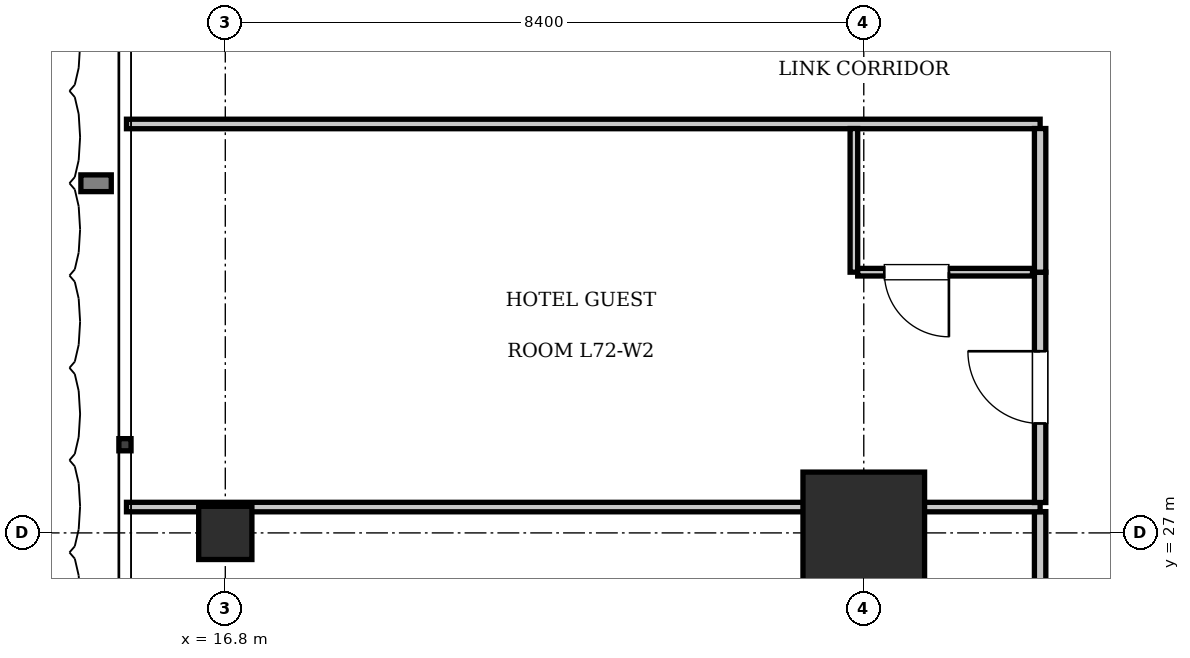
"""IFC4 building model, lengths in metres.
Left out: names, types, materials, properties, quantities, classifications, styles, units other than length and angle.
Written with IfcOpenShell. Run it as: python <this file> out.ifc"""

import sys

from ifc_helpers import new_model, si_unit, direction, frame, frame_2d, origin, origin_2d, place, context, subcontext, project, spatial, rectangle, extrude, element, fill, save


model = new_model("IFC4")
c1 = context("Model", 3, precision=1e-05, world=origin(), true_north=direction((0.0, 1.0)))
c2 = subcontext(c1, "Body", "Model", "MODEL_VIEW")
j1 = project(units=[si_unit("LENGTHUNIT", "METRE"), si_unit("PLANEANGLEUNIT", "RADIAN")], contexts=[c1])
p1 = place(None, origin())
s1 = spatial("IfcSite", under=j1, at=p1, CompositionType="ELEMENT")
p2 = place(p1, origin())
s2 = spatial("IfcBuilding", under=s1, at=p2, CompositionType="ELEMENT")
p3 = place(p2, frame((0.0, 0.0, 293.3)))
s3 = spatial("IfcBuildingStorey", under=s2, at=p3, CompositionType="ELEMENT", Elevation=293.3)
p4 = place(p3, frame((25.2, 27.0, 0.0), z_axis=(0.0, 0.0, 1.0), x_axis=(1.0, 0.0, 0.0)))
e1 = element("IfcColumn", 1, at=p4, inside=s3, PredefinedType="COLUMN", context=c2, shape_type="SweptSolid", body=[
    extrude(rectangle(XDim=1.6, YDim=1.6, at=origin_2d()), origin(), (0.0, 0.0, 1.0), 3.85),
])
p5 = place(p3, frame((16.8, 27.0, 0.0), z_axis=(0.0, 0.0, 1.0), x_axis=(1.0, 0.0, 0.0)))
e2 = element("IfcColumn", 2, at=p5, inside=s3, PredefinedType="COLUMN", context=c2, shape_type="SweptSolid", body=[
    extrude(rectangle(XDim=0.7, YDim=0.7, at=origin_2d()), origin(), (0.0, 0.0, 1.0), 3.85),
])
p6 = place(p3, frame((15.5, 32.38, 0.0), z_axis=(0.0, 0.0, 1.0), x_axis=(1.0, 0.0, 0.0)))
e3 = element("IfcWall", 3, at=p6, inside=s3, PredefinedType="PARTITIONING", context=c2, shape_type="SweptSolid", body=[
    extrude(rectangle(XDim=12.02, YDim=0.125, at=frame_2d((6.01, 0.0))), origin(), (0.0, 0.0, 1.0), 3.61),
])
p7 = place(p3, frame((27.52, 24.25, 0.0), z_axis=(0.0, 0.0, 1.0), x_axis=(0.0, 1.0, 0.0)))
e4 = element("IfcWall", 4, at=p7, inside=s3, PredefinedType="PARTITIONING", context=c2, shape_type="SweptSolid", body=[
    extrude(rectangle(XDim=3.03, YDim=0.15, at=frame_2d((1.515, 0.0))), origin(), (0.0, 0.0, 1.0), 3.61),
])
p8 = place(p7, frame((1.04, 0.0, 0.0)))
e5 = element("IfcOpeningElement", 5, at=p8, cuts=e4, PredefinedType="OPENING", context=c2, shape_type="SweptSolid", body=[
    extrude(rectangle(XDim=0.95, YDim=2.15, at=frame_2d((0.475, 1.075))), frame((0.0, 0.085, 0.0), z_axis=(0.0, -1.0, 0.0), x_axis=(1.0, 0.0, 0.0)), (0.0, 0.0, 1.0), 0.17),
])
p9 = place(p3, frame((15.5, 27.34, 0.0), z_axis=(0.0, 0.0, 1.0), x_axis=(1.0, 0.0, 0.0)))
e6 = element("IfcWall", 6, at=p9, inside=s3, PredefinedType="PARTITIONING", context=c2, shape_type="SweptSolid", body=[
    extrude(rectangle(XDim=12.02, YDim=0.125, at=frame_2d((6.01, 0.0))), origin(), (0.0, 0.0, 1.0), 3.61),
])
p10 = place(p3, frame((27.52, 27.4, 0.0), z_axis=(0.0, 0.0, 1.0), x_axis=(0.0, 1.0, 0.0)))
e7 = element("IfcWall", 7, at=p10, inside=s3, PredefinedType="PARTITIONING", context=c2, shape_type="SweptSolid", body=[
    extrude(rectangle(XDim=3.03, YDim=0.15, at=frame_2d((1.515, 0.0))), origin(), (0.0, 0.0, 1.0), 3.61),
])
p11 = place(p10, frame((1.04, 0.0, 0.0)))
e8 = element("IfcOpeningElement", 8, at=p11, cuts=e7, PredefinedType="OPENING", context=c2, shape_type="SweptSolid", body=[
    extrude(rectangle(XDim=0.95, YDim=2.15, at=frame_2d((0.475, 1.075))), frame((0.0, 0.085, 0.0), z_axis=(0.0, -1.0, 0.0), x_axis=(1.0, 0.0, 0.0)), (0.0, 0.0, 1.0), 0.17),
])
p12 = place(p3, frame((27.52, 30.43, 0.0), z_axis=(0.0, 0.0, 1.0), x_axis=(0.0, 1.0, 0.0)))
e9 = element("IfcWall", 9, at=p12, inside=s3, PredefinedType="PARTITIONING", context=c2, shape_type="SweptSolid", body=[
    extrude(rectangle(XDim=1.89, YDim=0.15, at=frame_2d((0.945, 0.0))), origin(), (0.0, 0.0, 1.0), 3.61),
])
p13 = place(p3, frame((25.07, 30.43, 0.0), z_axis=(0.0, 0.0, 1.0), x_axis=(0.0, 1.0, 0.0)))
e10 = element("IfcWall", 10, at=p13, inside=s3, PredefinedType="PARTITIONING", context=c2, shape_type="SweptSolid", body=[
    extrude(rectangle(XDim=1.89, YDim=0.1, at=frame_2d((0.945, 0.0))), origin(), (0.0, 0.0, 1.0), 3.61),
])
p14 = place(p3, frame((25.12, 30.43, 0.0), z_axis=(0.0, 0.0, 1.0), x_axis=(1.0, 0.0, 0.0)))
e11 = element("IfcWall", 11, at=p14, inside=s3, PredefinedType="PARTITIONING", context=c2, shape_type="SweptSolid", body=[
    extrude(rectangle(XDim=2.3, YDim=0.1, at=frame_2d((1.15, 0.0))), origin(), (0.0, 0.0, 1.0), 3.61),
])
p15 = place(p14, frame((0.35, 0.0, 0.0)))
e12 = element("IfcOpeningElement", 12, at=p15, cuts=e11, PredefinedType="OPENING", context=c2, shape_type="SweptSolid", body=[
    extrude(rectangle(XDim=0.85, YDim=2.1, at=frame_2d((0.425, 1.05))), frame((0.0, 0.06, 0.0), z_axis=(0.0, -1.0, 0.0), x_axis=(1.0, 0.0, 0.0)), (0.0, 0.0, 1.0), 0.12),
])
p16 = place(p15, frame((0.85, 0.0, 0.0), z_axis=(0.0, 0.0, 1.0), x_axis=(-1.0, 0.0, 0.0)))
e13 = element("IfcDoor", 13, at=p16, inside=s3, OperationType="SINGLE_SWING_LEFT", PredefinedType="DOOR", context=c2, shape_type="SweptSolid", body=[
    extrude(rectangle(XDim=0.85, YDim=2.1, at=frame_2d((0.425, 1.05))), frame((0.0, 0.025, 0.0), z_axis=(0.0, -1.0, 0.0), x_axis=(1.0, 0.0, 0.0)), (0.0, 0.0, 1.0), 0.05),
])
fill(e12, e13)
p17 = place(p11, origin())
e14 = element("IfcDoor", 14, at=p17, inside=s3, OperationType="SINGLE_SWING_RIGHT", PredefinedType="DOOR", context=c2, shape_type="SweptSolid", body=[
    extrude(rectangle(XDim=0.95, YDim=2.15, at=frame_2d((0.475, 1.075))), frame((0.0, 0.025, 0.0), z_axis=(0.0, -1.0, 0.0), x_axis=(1.0, 0.0, 0.0)), (0.0, 0.0, 1.0), 0.05),
])
fill(e8, e14)
save(model, sys.argv[1])
